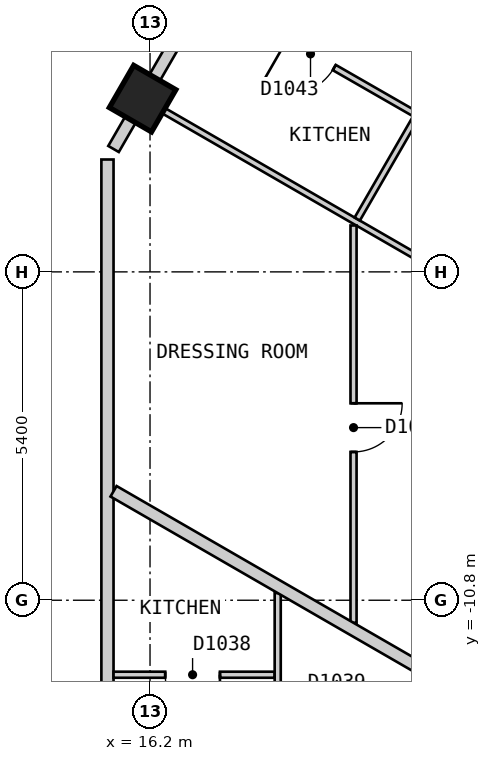
"""IFC4 building model, lengths in metres.
Left out: names, types, materials, properties, quantities, classifications, styles, units other than length and angle.
Written with IfcOpenShell. Run it as: python <this file> out.ifc"""

import sys

from ifc_helpers import new_model, si_unit, direction, frame, frame_2d, origin, origin_2d, place, context, subcontext, project, spatial, polyline, rectangle, outline, extrude, element, fill, save


model = new_model("IFC4")
c1 = context("Model", 3, precision=1e-05, world=origin(), true_north=direction((0.0, 1.0)))
c2 = subcontext(c1, "Body", "Model", "MODEL_VIEW")
j1 = project(units=[si_unit("LENGTHUNIT", "METRE"), si_unit("PLANEANGLEUNIT", "RADIAN")], contexts=[c1])
p1 = place(None, origin())
s1 = spatial("IfcSite", under=j1, at=p1, CompositionType="ELEMENT")
p2 = place(p1, origin())
s2 = spatial("IfcBuilding", under=s1, at=p2, CompositionType="ELEMENT")
p3 = place(p2, frame((0.0, 0.0, 126.6)))
s3 = spatial("IfcBuildingStorey", under=s2, at=p3, CompositionType="ELEMENT", Elevation=126.6)
p4 = place(p3, frame((16.078, -2.551, 0.0), z_axis=(0.0, 0.0, 1.0), x_axis=(0.5, 0.866025403784, 0.0)))
e1 = element("IfcColumn", 1, at=p4, inside=s3, PredefinedType="COLUMN", context=c2, shape_type="SweptSolid", body=[
    extrude(rectangle(XDim=0.8, YDim=0.8, at=origin_2d()), origin(), (0.0, 0.0, 1.0), 3.0),
])
p5 = place(p3, frame((15.862, -23.425, 0.0), z_axis=(0.0, 0.0, 1.0), x_axis=(0.500017503135, 0.866015298109, 0.0)))
e2 = element("IfcWall", 2, at=p5, inside=s3, PredefinedType="SOLIDWALL", context=c2, shape_type="SweptSolid", body=[
    extrude(outline(polyline([(0.0, -0.15), (24.711, -0.15), (24.631, 0.15), (0.08, 0.15), (0.0, -0.15)])), origin(), (0.0, 0.0, 1.0), 2.7),
])
p6 = place(p5, frame((1.4, 0.0, 0.15)))
e3 = element("IfcOpeningElement", 3, at=p6, cuts=e2, PredefinedType="OPENING", context=c2, shape_type="SweptSolid", body=[
    extrude(rectangle(XDim=1.5, YDim=2.1, at=frame_2d((0.75, 1.05))), frame((0.0, 0.16, 0.0), z_axis=(0.0, -1.0, 0.0), x_axis=(1.0, 0.0, 0.0)), (0.0, 0.0, 1.0), 0.32),
])
p7 = place(p5, frame((4.316, 0.0, 0.15)))
e4 = element("IfcOpeningElement", 4, at=p7, cuts=e2, PredefinedType="OPENING", context=c2, shape_type="SweptSolid", body=[
    extrude(rectangle(XDim=1.5, YDim=2.1, at=frame_2d((0.75, 1.05))), frame((0.0, 0.16, 0.0), z_axis=(0.0, -1.0, 0.0), x_axis=(1.0, 0.0, 0.0)), (0.0, 0.0, 1.0), 0.32),
])
p8 = place(p5, frame((7.231, 0.0, 0.15)))
e5 = element("IfcOpeningElement", 5, at=p8, cuts=e2, PredefinedType="OPENING", context=c2, shape_type="SweptSolid", body=[
    extrude(rectangle(XDim=1.5, YDim=2.1, at=frame_2d((0.75, 1.05))), frame((0.0, 0.16, 0.0), z_axis=(0.0, -1.0, 0.0), x_axis=(1.0, 0.0, 0.0)), (0.0, 0.0, 1.0), 0.32),
])
p9 = place(p5, frame((10.147, 0.0, 0.15)))
e6 = element("IfcOpeningElement", 6, at=p9, cuts=e2, PredefinedType="OPENING", context=c2, shape_type="SweptSolid", body=[
    extrude(rectangle(XDim=1.5, YDim=2.1, at=frame_2d((0.75, 1.05))), frame((0.0, 0.16, 0.0), z_axis=(0.0, -1.0, 0.0), x_axis=(1.0, 0.0, 0.0)), (0.0, 0.0, 1.0), 0.32),
])
p10 = place(p5, frame((13.062, 0.0, 0.15)))
e7 = element("IfcOpeningElement", 7, at=p10, cuts=e2, PredefinedType="OPENING", context=c2, shape_type="SweptSolid", body=[
    extrude(rectangle(XDim=1.5, YDim=2.1, at=frame_2d((0.75, 1.05))), frame((0.0, 0.16, 0.0), z_axis=(0.0, -1.0, 0.0), x_axis=(1.0, 0.0, 0.0)), (0.0, 0.0, 1.0), 0.32),
])
p11 = place(p5, frame((15.977, 0.0, 0.15)))
e8 = element("IfcOpeningElement", 8, at=p11, cuts=e2, PredefinedType="OPENING", context=c2, shape_type="SweptSolid", body=[
    extrude(rectangle(XDim=1.5, YDim=2.1, at=frame_2d((0.75, 1.05))), frame((0.0, 0.16, 0.0), z_axis=(0.0, -1.0, 0.0), x_axis=(1.0, 0.0, 0.0)), (0.0, 0.0, 1.0), 0.32),
])
p12 = place(p5, frame((18.893, 0.0, 0.15)))
e9 = element("IfcOpeningElement", 9, at=p12, cuts=e2, PredefinedType="OPENING", context=c2, shape_type="SweptSolid", body=[
    extrude(rectangle(XDim=1.5, YDim=2.1, at=frame_2d((0.75, 1.05))), frame((0.0, 0.16, 0.0), z_axis=(0.0, -1.0, 0.0), x_axis=(1.0, 0.0, 0.0)), (0.0, 0.0, 1.0), 0.32),
])
p13 = place(p5, frame((21.809, 0.0, 0.15)))
e10 = element("IfcOpeningElement", 10, at=p13, cuts=e2, PredefinedType="OPENING", context=c2, shape_type="SweptSolid", body=[
    extrude(rectangle(XDim=1.5, YDim=2.1, at=frame_2d((0.75, 1.05))), frame((0.0, 0.16, 0.0), z_axis=(0.0, -1.0, 0.0), x_axis=(1.0, 0.0, 0.0)), (0.0, 0.0, 1.0), 0.32),
])
p14 = place(p3, frame((13.394, -2.8, 0.0), z_axis=(0.0, 0.0, 1.0), x_axis=(0.499968324138, 0.866043691079, 0.0)))
e11 = element("IfcWall", 11, at=p14, inside=s3, PredefinedType="PARTITIONING", context=c2, shape_type="SweptSolid", body=[
    extrude(rectangle(XDim=3.696, YDim=0.2, at=frame_2d((1.848, 0.0))), origin(), (0.0, 0.0, 1.0), 2.7),
])
p15 = place(p3, frame((15.6, -3.379, 0.0), z_axis=(0.0, 0.0, 1.0), x_axis=(0.499896543382, 0.866085126252, 0.0)))
e12 = element("IfcWall", 12, at=p15, inside=s3, PredefinedType="PARTITIONING", context=c2, shape_type="SweptSolid", body=[
    extrude(rectangle(XDim=4.249, YDim=0.2, at=frame_2d((2.125, 0.0))), origin(), (0.0, 0.0, 1.0), 2.7),
])
p16 = place(p15, frame((3.232, 0.0, 0.0)))
e13 = element("IfcOpeningElement", 13, at=p16, cuts=e12, PredefinedType="OPENING", context=c2, shape_type="SweptSolid", body=[
    extrude(rectangle(XDim=0.8, YDim=2.1, at=frame_2d((0.4, 1.05))), frame((0.0, 0.11, 0.0), z_axis=(0.0, -1.0, 0.0), x_axis=(1.0, 0.0, 0.0)), (0.0, 0.0, 1.0), 0.22),
])
p17 = place(p3, frame((15.5, -21.2, 0.0), z_axis=(0.0, 0.0, 1.0), x_axis=(0.0, 1.0, 0.0)))
e14 = element("IfcWall", 14, at=p17, inside=s3, PredefinedType="PARTITIONING", context=c2, shape_type="SweptSolid", body=[
    extrude(rectangle(XDim=17.648, YDim=0.2, at=frame_2d((8.824, 0.0))), origin(), (0.0, 0.0, 1.0), 2.7),
])
p18 = place(p17, frame((7.575, 0.0, 0.0)))
e15 = element("IfcOpeningElement", 15, at=p18, cuts=e14, PredefinedType="OPENING", context=c2, shape_type="SweptSolid", body=[
    extrude(rectangle(XDim=1.0, YDim=2.1, at=frame_2d((0.5, 1.05))), frame((0.0, 0.11, 0.0), z_axis=(0.0, -1.0, 0.0), x_axis=(1.0, 0.0, 0.0)), (0.0, 0.0, 1.0), 0.22),
])
p19 = place(p3, frame((16.165, -2.601, 0.0), z_axis=(0.0, 0.0, 1.0), x_axis=(0.866016855193, -0.500014806302, 0.0)))
e16 = element("IfcWall", 16, at=p19, inside=s3, PredefinedType="PARTITIONING", context=c2, shape_type="SweptSolid", body=[
    extrude(rectangle(XDim=10.0, YDim=0.1, at=frame_2d((5.0, 0.0))), origin(), (0.0, 0.0, 1.0), 2.7),
])
p20 = place(p19, frame((6.524, 0.0, 0.0)))
e17 = element("IfcOpeningElement", 17, at=p20, cuts=e16, PredefinedType="OPENING", context=c2, shape_type="SweptSolid", body=[
    extrude(rectangle(XDim=0.9, YDim=2.1, at=frame_2d((0.45, 1.05))), frame((0.0, 0.06, 0.0), z_axis=(0.0, -1.0, 0.0), x_axis=(1.0, 0.0, 0.0)), (0.0, 0.0, 1.0), 0.12),
])
p21 = place(p3, frame((17.171, -0.857, 0.0), z_axis=(0.0, 0.0, 1.0), x_axis=(0.867173455867, -0.49800622229, 0.0)))
e18 = element("IfcWall", 18, at=p21, inside=s3, PredefinedType="PARTITIONING", context=c2, shape_type="SweptSolid", body=[
    extrude(rectangle(XDim=3.898, YDim=0.1, at=frame_2d((1.949, 0.0))), origin(), (0.0, 0.0, 1.0), 2.7),
])
p22 = place(p21, frame((1.474, 0.0, 0.0)))
e19 = element("IfcOpeningElement", 19, at=p22, cuts=e18, PredefinedType="OPENING", context=c2, shape_type="SweptSolid", body=[
    extrude(rectangle(XDim=0.9, YDim=2.1, at=frame_2d((0.45, 1.05))), frame((0.0, 0.06, 0.0), z_axis=(0.0, -1.0, 0.0), x_axis=(1.0, 0.0, 0.0)), (0.0, 0.0, 1.0), 0.12),
])
p23 = place(p3, frame((15.6, -12.025, 0.0), z_axis=(0.0, 0.0, 1.0), x_axis=(1.0, 0.0, 0.0)))
e20 = element("IfcWall", 20, at=p23, inside=s3, PredefinedType="PARTITIONING", context=c2, shape_type="SweptSolid", body=[
    extrude(rectangle(XDim=2.65, YDim=0.1, at=frame_2d((1.325, 0.0))), origin(), (0.0, 0.0, 1.0), 2.7),
])
p24 = place(p23, frame((0.85, 0.0, 0.0)))
e21 = element("IfcOpeningElement", 21, at=p24, cuts=e20, PredefinedType="OPENING", context=c2, shape_type="SweptSolid", body=[
    extrude(rectangle(XDim=0.9, YDim=2.1, at=frame_2d((0.45, 1.05))), frame((0.0, 0.06, 0.0), z_axis=(0.0, -1.0, 0.0), x_axis=(1.0, 0.0, 0.0)), (0.0, 0.0, 1.0), 0.12),
])
p25 = place(p3, frame((19.608, -4.531, 0.0), z_axis=(0.0, 0.0, 1.0), x_axis=(0.500035555316, 0.86600487494, 0.0)))
e22 = element("IfcWall", 22, at=p25, inside=s3, PredefinedType="PARTITIONING", context=c2, shape_type="SweptSolid", body=[
    extrude(rectangle(XDim=5.58, YDim=0.1, at=frame_2d((2.79, 0.0))), origin(), (0.0, 0.0, 1.0), 2.7),
])
p26 = place(p25, frame((2.372, 0.0, 0.0)))
e23 = element("IfcOpeningElement", 23, at=p26, cuts=e22, PredefinedType="OPENING", context=c2, shape_type="SweptSolid", body=[
    extrude(rectangle(XDim=0.9, YDim=2.1, at=frame_2d((0.45, 1.05))), frame((0.0, 0.06, 0.0), z_axis=(0.0, -1.0, 0.0), x_axis=(1.0, 0.0, 0.0)), (0.0, 0.0, 1.0), 0.12),
])
p27 = place(p3, frame((18.3, -17.3, 0.0), z_axis=(0.0, 0.0, 1.0), x_axis=(0.0, 1.0, 0.0)))
e24 = element("IfcWall", 24, at=p27, inside=s3, PredefinedType="PARTITIONING", context=c2, shape_type="SweptSolid", body=[
    extrude(rectangle(XDim=6.618, YDim=0.1, at=frame_2d((3.309, 0.0))), origin(), (0.0, 0.0, 1.0), 2.7),
])
p28 = place(p27, frame((3.725, 0.0, 0.0)))
e25 = element("IfcOpeningElement", 25, at=p28, cuts=e24, PredefinedType="OPENING", context=c2, shape_type="SweptSolid", body=[
    extrude(rectangle(XDim=0.9, YDim=2.1, at=frame_2d((0.45, 1.05))), frame((0.0, 0.06, 0.0), z_axis=(0.0, -1.0, 0.0), x_axis=(1.0, 0.0, 0.0)), (0.0, 0.0, 1.0), 0.12),
])
p29 = place(p3, frame((19.547, -11.171, 0.0), z_axis=(0.0, 0.0, 1.0), x_axis=(0.0, 1.0, 0.0)))
e26 = element("IfcWall", 26, at=p29, inside=s3, PredefinedType="PARTITIONING", context=c2, shape_type="SweptSolid", body=[
    extrude(rectangle(XDim=6.534, YDim=0.1, at=frame_2d((3.267, 0.0))), origin(), (0.0, 0.0, 1.0), 2.7),
])
p30 = place(p29, frame((2.81, 0.0, 0.0)))
e27 = element("IfcOpeningElement", 27, at=p30, cuts=e26, PredefinedType="OPENING", context=c2, shape_type="SweptSolid", body=[
    extrude(rectangle(XDim=0.8, YDim=2.1, at=frame_2d((0.4, 1.05))), frame((0.0, 0.06, 0.0), z_axis=(0.0, -1.0, 0.0), x_axis=(1.0, 0.0, 0.0)), (0.0, 0.0, 1.0), 0.12),
])
p31 = place(p3, frame((15.6, -9.008, 0.0), z_axis=(0.0, 0.0, 1.0), x_axis=(0.866034366408, -0.499984475959, 0.0)))
e28 = element("IfcWall", 28, at=p31, inside=s3, PredefinedType="PARTITIONING", context=c2, shape_type="SweptSolid", body=[
    extrude(rectangle(XDim=7.286, YDim=0.2, at=frame_2d((3.643, 0.0))), origin(), (0.0, 0.0, 1.0), 2.7),
])
p32 = place(p24, origin())
e29 = element("IfcDoor", 29, at=p32, inside=s3, OperationType="SINGLE_SWING_RIGHT", PredefinedType="DOOR", context=c2, shape_type="SweptSolid", body=[
    extrude(rectangle(XDim=0.9, YDim=2.1, at=frame_2d((0.45, 1.05))), frame((0.0, 0.025, 0.0), z_axis=(0.0, -1.0, 0.0), x_axis=(1.0, 0.0, 0.0)), (0.0, 0.0, 1.0), 0.05),
])
fill(e21, e29)
p33 = place(p22, origin())
e30 = element("IfcDoor", 30, at=p33, inside=s3, OperationType="SINGLE_SWING_LEFT", PredefinedType="DOOR", context=c2, shape_type="SweptSolid", body=[
    extrude(rectangle(XDim=0.9, YDim=2.1, at=frame_2d((0.45, 1.05))), frame((0.0, 0.025, 0.0), z_axis=(0.0, -1.0, 0.0), x_axis=(1.0, 0.0, 0.0)), (0.0, 0.0, 1.0), 0.05),
])
fill(e19, e30)
p34 = place(p30, origin())
e31 = element("IfcDoor", 31, at=p34, inside=s3, OperationType="SINGLE_SWING_RIGHT", PredefinedType="DOOR", context=c2, shape_type="SweptSolid", body=[
    extrude(rectangle(XDim=0.8, YDim=2.1, at=frame_2d((0.4, 1.05))), frame((0.0, 0.025, 0.0), z_axis=(0.0, -1.0, 0.0), x_axis=(1.0, 0.0, 0.0)), (0.0, 0.0, 1.0), 0.05),
])
fill(e27, e31)
save(model, sys.argv[1])
